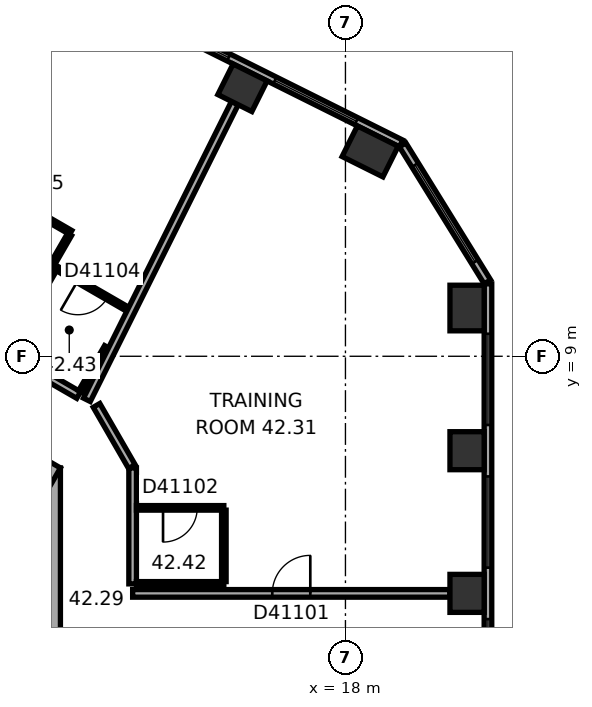
"""IFC4 building model, lengths in metres.
Left out: names, types, materials, properties, quantities, classifications, styles, units other than length and angle.
Written with IfcOpenShell. Run it as: python <this file> out.ifc"""

import sys

from ifc_helpers import new_model, si_unit, direction, frame, frame_2d, origin, origin_2d, place, context, subcontext, project, spatial, rectangle, extrude, element, fill, save


model = new_model("IFC4")
c1 = context("Model", 3, precision=1e-05, world=origin(), true_north=direction((0.0, 1.0)))
c2 = subcontext(c1, "Body", "Model", "MODEL_VIEW")
j1 = project(units=[si_unit("LENGTHUNIT", "METRE"), si_unit("PLANEANGLEUNIT", "RADIAN")], contexts=[c1])
p1 = place(None, origin())
s1 = spatial("IfcSite", under=j1, at=p1, CompositionType="ELEMENT")
p2 = place(p1, origin())
s2 = spatial("IfcBuilding", under=s1, at=p2, CompositionType="ELEMENT")
p3 = place(p2, frame((0.0, 0.0, 172.5)))
s3 = spatial("IfcBuildingStorey", under=s2, at=p3, CompositionType="ELEMENT", Elevation=172.5)
for number, where, z_axis, x_axis in (
    (1, (21.2, 2.761, 0.0), (0.0, 0.0, 1.0), (0.0, 1.0, 0.0)),
    (2, (21.2, 6.515, 0.0), (0.0, 0.0, 1.0), (0.0, 1.0, 0.0)),
):
    element("IfcColumn", number, at=place(p3, frame(where, z_axis=z_axis, x_axis=x_axis)), inside=s3, PredefinedType="COLUMN", context=c2, shape_type="SweptSolid", body=[
        extrude(rectangle(XDim=1.0, YDim=0.9, at=origin_2d()), origin(), (0.0, 0.0, 1.0), 3.7),
    ])
for number, where, z_axis, x_axis in (
    (3, (21.2, 10.27, 0.0), (0.0, 0.0, 1.0), (0.0, 1.0, 0.0)),
    (4, (18.65, 14.39, 0.0), (0.0, 0.0, 1.0), (-0.895, 0.446, 0.0)),
):
    element("IfcColumn", number, at=place(p3, frame(where, z_axis=z_axis, x_axis=x_axis)), inside=s3, PredefinedType="COLUMN", context=c2, shape_type="SweptSolid", body=[
        extrude(rectangle(XDim=1.2, YDim=0.9, at=origin_2d()), origin(), (0.0, 0.0, 1.0), 3.7),
    ])
p4 = place(p3, frame((15.29, 16.065, 0.0), z_axis=(0.0, 0.0, 1.0), x_axis=(-0.894934361602, 0.44619781311, 0.0)))
e5 = element("IfcColumn", 5, at=p4, inside=s3, PredefinedType="COLUMN", context=c2, shape_type="SweptSolid", body=[
    extrude(rectangle(XDim=1.0, YDim=0.9, at=origin_2d()), origin(), (0.0, 0.0, 1.0), 3.7),
])
p5 = place(p3, frame((10.0, -6.062, 0.0), z_axis=(0.0, 0.0, 1.0), x_axis=(0.0, 1.0, 0.0)))
e6 = element("IfcWall", 6, at=p5, inside=s3, PredefinedType="SHEAR", context=c2, shape_type="SweptSolid", body=[
    extrude(rectangle(XDim=12.125, YDim=1.0, at=frame_2d((6.062, 0.0))), origin(), (0.0, 0.0, 1.0), 3.7),
])
p6 = place(p5, frame((6.262, 0.0, 0.0)))
e7 = element("IfcOpeningElement", 7, at=p6, cuts=e6, PredefinedType="OPENING", context=c2, shape_type="SweptSolid", body=[
    extrude(rectangle(XDim=1.5, YDim=2.1, at=frame_2d((0.75, 1.05))), frame((0.0, 0.51, 0.0), z_axis=(0.0, -1.0, 0.0), x_axis=(1.0, 0.0, 0.0)), (0.0, 0.0, 1.0), 1.02),
])
p7 = place(p5, frame((1.812, 0.0, 0.0)))
e8 = element("IfcOpeningElement", 8, at=p7, cuts=e6, PredefinedType="OPENING", context=c2, shape_type="SweptSolid", body=[
    extrude(rectangle(XDim=0.9, YDim=2.1, at=frame_2d((0.45, 1.05))), frame((0.0, 0.51, 0.0), z_axis=(0.0, -1.0, 0.0), x_axis=(1.0, 0.0, 0.0)), (0.0, 0.0, 1.0), 1.02),
])
p8 = place(p5, frame((4.412, 0.0, 0.0)))
e9 = element("IfcOpeningElement", 9, at=p8, cuts=e6, PredefinedType="OPENING", context=c2, shape_type="SweptSolid", body=[
    extrude(rectangle(XDim=0.9, YDim=2.1, at=frame_2d((0.45, 1.05))), frame((0.0, 0.51, 0.0), z_axis=(0.0, -1.0, 0.0), x_axis=(1.0, 0.0, 0.0)), (0.0, 0.0, 1.0), 1.02),
])
p9 = place(p3, frame((10.25, 5.629, 0.0), z_axis=(0.0, 0.0, 1.0), x_axis=(-0.866022616891, 0.50000482701, 0.0)))
e10 = element("IfcWall", 10, at=p9, inside=s3, PredefinedType="SHEAR", context=c2, shape_type="SweptSolid", body=[
    extrude(rectangle(XDim=12.125, YDim=1.0, at=frame_2d((6.062, 0.0))), origin(), (0.0, 0.0, 1.0), 3.7),
])
p10 = place(p9, frame((4.012, 0.0, 0.0)))
e11 = element("IfcOpeningElement", 11, at=p10, cuts=e10, PredefinedType="OPENING", context=c2, shape_type="SweptSolid", body=[
    extrude(rectangle(XDim=0.9, YDim=2.1, at=frame_2d((0.45, 1.05))), frame((0.0, 0.51, 0.0), z_axis=(0.0, -1.0, 0.0), x_axis=(1.0, 0.0, 0.0)), (0.0, 0.0, 1.0), 1.02),
])
p11 = place(p9, frame((7.912, 0.0, 0.0)))
e12 = element("IfcOpeningElement", 12, at=p11, cuts=e10, PredefinedType="OPENING", context=c2, shape_type="SweptSolid", body=[
    extrude(rectangle(XDim=0.9, YDim=2.1, at=frame_2d((0.45, 1.05))), frame((0.0, 0.51, 0.0), z_axis=(0.0, -1.0, 0.0), x_axis=(1.0, 0.0, 0.0)), (0.0, 0.0, 1.0), 1.02),
])
p12 = place(p3, frame((21.75, -9.138, 0.0), z_axis=(0.0, 0.0, 1.0), x_axis=(0.0, 1.0, 0.0)))
e13 = element("IfcWall", 13, at=p12, inside=s3, PredefinedType="STANDARD", context=c2, shape_type="SweptSolid", body=[
    extrude(rectangle(XDim=20.044, YDim=0.2, at=frame_2d((10.022, 0.0))), origin(), (0.0, 0.0, 1.0), 3.7),
])
p13 = place(p12, frame((1.314, 0.0, 0.9)))
e14 = element("IfcOpeningElement", 14, at=p13, cuts=e13, PredefinedType="OPENING", context=c2, shape_type="SweptSolid", body=[
    extrude(rectangle(XDim=2.4, YDim=2.0, at=frame_2d((1.2, 1.0))), frame((0.0, 0.11, 0.0), z_axis=(0.0, -1.0, 0.0), x_axis=(1.0, 0.0, 0.0)), (0.0, 0.0, 1.0), 0.22),
])
p14 = place(p12, frame((5.069, 0.0, 0.9)))
e15 = element("IfcOpeningElement", 15, at=p14, cuts=e13, PredefinedType="OPENING", context=c2, shape_type="SweptSolid", body=[
    extrude(rectangle(XDim=2.4, YDim=2.0, at=frame_2d((1.2, 1.0))), frame((0.0, 0.11, 0.0), z_axis=(0.0, -1.0, 0.0), x_axis=(1.0, 0.0, 0.0)), (0.0, 0.0, 1.0), 0.22),
])
p15 = place(p12, frame((8.823, 0.0, 0.9)))
e16 = element("IfcOpeningElement", 16, at=p15, cuts=e13, PredefinedType="OPENING", context=c2, shape_type="SweptSolid", body=[
    extrude(rectangle(XDim=2.4, YDim=2.0, at=frame_2d((1.2, 1.0))), frame((0.0, 0.11, 0.0), z_axis=(0.0, -1.0, 0.0), x_axis=(1.0, 0.0, 0.0)), (0.0, 0.0, 1.0), 0.22),
])
p16 = place(p12, frame((12.577, 0.0, 0.9)))
e17 = element("IfcOpeningElement", 17, at=p16, cuts=e13, PredefinedType="OPENING", context=c2, shape_type="SweptSolid", body=[
    extrude(rectangle(XDim=2.4, YDim=2.0, at=frame_2d((1.2, 1.0))), frame((0.0, 0.11, 0.0), z_axis=(0.0, -1.0, 0.0), x_axis=(1.0, 0.0, 0.0)), (0.0, 0.0, 1.0), 0.22),
])
p17 = place(p12, frame((16.331, 0.0, 0.9)))
e18 = element("IfcOpeningElement", 18, at=p17, cuts=e13, PredefinedType="OPENING", context=c2, shape_type="SweptSolid", body=[
    extrude(rectangle(XDim=2.4, YDim=2.0, at=frame_2d((1.2, 1.0))), frame((0.0, 0.11, 0.0), z_axis=(0.0, -1.0, 0.0), x_axis=(1.0, 0.0, 0.0)), (0.0, 0.0, 1.0), 0.22),
])
p18 = place(p3, frame((21.735, 10.958, 0.0), z_axis=(0.0, 0.0, 1.0), x_axis=(-0.526213807775, 0.850352296702, 0.0)))
e19 = element("IfcWall", 19, at=p18, inside=s3, PredefinedType="STANDARD", context=c2, shape_type="SweptSolid", body=[
    extrude(rectangle(XDim=4.238, YDim=0.2, at=frame_2d((2.119, 0.0))), origin(), (0.0, 0.0, 1.0), 3.7),
])
p19 = place(p18, frame((0.619, 0.0, 0.9)))
e20 = element("IfcOpeningElement", 20, at=p19, cuts=e19, PredefinedType="OPENING", context=c2, shape_type="SweptSolid", body=[
    extrude(rectangle(XDim=3.0, YDim=2.0, at=frame_2d((1.5, 1.0))), frame((0.0, 0.11, 0.0), z_axis=(0.0, -1.0, 0.0), x_axis=(1.0, 0.0, 0.0)), (0.0, 0.0, 1.0), 0.22),
])
p20 = place(p3, frame((19.464, 14.599, 0.0), z_axis=(0.0, 0.0, 1.0), x_axis=(-0.894935755043, 0.446195018289, 0.0)))
e21 = element("IfcWall", 21, at=p20, inside=s3, PredefinedType="STANDARD", context=c2, shape_type="SweptSolid", body=[
    extrude(rectangle(XDim=20.044, YDim=0.2, at=frame_2d((10.022, 0.0))), origin(), (0.0, 0.0, 1.0), 3.7),
])
p21 = place(p20, frame((1.313, 0.0, 0.9)))
e22 = element("IfcOpeningElement", 22, at=p21, cuts=e21, PredefinedType="OPENING", context=c2, shape_type="SweptSolid", body=[
    extrude(rectangle(XDim=2.4, YDim=2.0, at=frame_2d((1.2, 1.0))), frame((0.0, 0.11, 0.0), z_axis=(0.0, -1.0, 0.0), x_axis=(1.0, 0.0, 0.0)), (0.0, 0.0, 1.0), 0.22),
])
p22 = place(p20, frame((5.067, 0.0, 0.9)))
e23 = element("IfcOpeningElement", 23, at=p22, cuts=e21, PredefinedType="OPENING", context=c2, shape_type="SweptSolid", body=[
    extrude(rectangle(XDim=2.4, YDim=2.0, at=frame_2d((1.2, 1.0))), frame((0.0, 0.11, 0.0), z_axis=(0.0, -1.0, 0.0), x_axis=(1.0, 0.0, 0.0)), (0.0, 0.0, 1.0), 0.22),
])
p23 = place(p20, frame((8.821, 0.0, 0.9)))
e24 = element("IfcOpeningElement", 24, at=p23, cuts=e21, PredefinedType="OPENING", context=c2, shape_type="SweptSolid", body=[
    extrude(rectangle(XDim=2.4, YDim=2.0, at=frame_2d((1.2, 1.0))), frame((0.0, 0.11, 0.0), z_axis=(0.0, -1.0, 0.0), x_axis=(1.0, 0.0, 0.0)), (0.0, 0.0, 1.0), 0.22),
])
p24 = place(p20, frame((12.575, 0.0, 0.9)))
e25 = element("IfcOpeningElement", 25, at=p24, cuts=e21, PredefinedType="OPENING", context=c2, shape_type="SweptSolid", body=[
    extrude(rectangle(XDim=2.4, YDim=2.0, at=frame_2d((1.2, 1.0))), frame((0.0, 0.11, 0.0), z_axis=(0.0, -1.0, 0.0), x_axis=(1.0, 0.0, 0.0)), (0.0, 0.0, 1.0), 0.22),
])
p25 = place(p20, frame((16.329, 0.0, 0.9)))
e26 = element("IfcOpeningElement", 26, at=p25, cuts=e21, PredefinedType="OPENING", context=c2, shape_type="SweptSolid", body=[
    extrude(rectangle(XDim=2.4, YDim=2.0, at=frame_2d((1.2, 1.0))), frame((0.0, 0.11, 0.0), z_axis=(0.0, -1.0, 0.0), x_axis=(1.0, 0.0, 0.0)), (0.0, 0.0, 1.0), 0.22),
])
p26 = place(p3, frame((7.878, 13.927, 0.0), z_axis=(0.0, 0.0, 1.0), x_axis=(0.866021245731, -0.500007201891, 0.0)))
e27 = element("IfcWall", 27, at=p26, inside=s3, PredefinedType="PARTITIONING", context=c2, shape_type="SweptSolid", body=[
    extrude(rectangle(XDim=3.34, YDim=0.12, at=frame_2d((1.67, 0.0))), origin(), (0.0, 0.0, 1.0), 3.42),
])
p27 = place(p26, frame((1.22, 0.0, 0.0)))
e28 = element("IfcOpeningElement", 28, at=p27, cuts=e27, PredefinedType="OPENING", context=c2, shape_type="SweptSolid", body=[
    extrude(rectangle(XDim=0.9, YDim=2.1, at=frame_2d((0.45, 1.05))), frame((0.0, 0.07, 0.0), z_axis=(0.0, -1.0, 0.0), x_axis=(1.0, 0.0, 0.0)), (0.0, 0.0, 1.0), 0.14),
])
p28 = place(p3, frame((9.125, 9.166, 0.0), z_axis=(0.0, 0.0, 1.0), x_axis=(0.500004234368, 0.866022959057, 0.0)))
e29 = element("IfcWall", 29, at=p28, inside=s3, PredefinedType="PARTITIONING", context=c2, shape_type="SweptSolid", body=[
    extrude(rectangle(XDim=2.5, YDim=0.12, at=frame_2d((1.25, 0.0))), origin(), (0.0, 0.0, 1.0), 3.42),
])
p29 = place(p3, frame((10.427, 11.301, 0.0), z_axis=(0.0, 0.0, 1.0), x_axis=(0.866019511163, -0.500010206181, 0.0)))
e30 = element("IfcWall", 30, at=p29, inside=s3, PredefinedType="PARTITIONING", context=c2, shape_type="SweptSolid", body=[
    extrude(rectangle(XDim=2.13, YDim=0.12, at=frame_2d((1.065, 0.0))), origin(), (0.0, 0.0, 1.0), 3.42),
])
p30 = place(p29, frame((0.615, 0.0, 0.0)))
e31 = element("IfcOpeningElement", 31, at=p30, cuts=e30, PredefinedType="OPENING", context=c2, shape_type="SweptSolid", body=[
    extrude(rectangle(XDim=0.9, YDim=2.1, at=frame_2d((0.45, 1.05))), frame((0.0, 0.07, 0.0), z_axis=(0.0, -1.0, 0.0), x_axis=(1.0, 0.0, 0.0)), (0.0, 0.0, 1.0), 0.14),
])
p31 = place(p3, frame((10.74, 12.205, 0.0), z_axis=(0.0, 0.0, 1.0), x_axis=(-0.499978425106, -0.866037859697, 0.0)))
e32 = element("IfcWall", 32, at=p31, inside=s3, PredefinedType="PARTITIONING", context=c2, shape_type="SweptSolid", body=[
    extrude(rectangle(XDim=3.44, YDim=0.12, at=frame_2d((1.72, 0.0))), origin(), (0.0, 0.0, 1.0), 3.42),
])
p32 = place(p3, frame((10.98, 7.979, 0.0), z_axis=(0.0, 0.0, 1.0), x_axis=(-0.866008176907, 0.50002983664, 0.0)))
e33 = element("IfcWall", 33, at=p32, inside=s3, PredefinedType="PARTITIONING", context=c2, shape_type="SweptSolid", body=[
    extrude(rectangle(XDim=2.2, YDim=0.2, at=frame_2d((1.1, 0.0))), origin(), (0.0, 0.0, 1.0), 3.42),
])
p33 = place(p3, frame((11.714, 9.25, 0.0), z_axis=(0.0, 0.0, 1.0), x_axis=(-0.500015945769, -0.866016197294, 0.0)))
e34 = element("IfcWall", 34, at=p33, inside=s3, PredefinedType="PARTITIONING", context=c2, shape_type="SweptSolid", body=[
    extrude(rectangle(XDim=1.368, YDim=0.12, at=frame_2d((0.684, 0.0))), origin(), (0.0, 0.0, 1.0), 3.42),
])
p34 = place(p3, frame((12.38, 6.097, 0.0), z_axis=(0.0, 0.0, 1.0), x_axis=(-0.499964847546, 0.866045698112, 0.0)))
e35 = element("IfcWall", 35, at=p34, inside=s3, PredefinedType="PARTITIONING", context=c2, shape_type="SweptSolid", body=[
    extrude(rectangle(XDim=1.86, YDim=0.2, at=frame_2d((0.93, 0.0))), origin(), (0.0, 0.0, 1.0), 3.42),
])
p35 = place(p3, frame((12.4, 3.011, 0.0), z_axis=(0.0, 0.0, 1.0), x_axis=(0.0, 1.0, 0.0)))
e36 = element("IfcWall", 36, at=p35, inside=s3, PredefinedType="PARTITIONING", context=c2, shape_type="SweptSolid", body=[
    extrude(rectangle(XDim=3.051, YDim=0.2, at=frame_2d((1.525, 0.0))), origin(), (0.0, 0.0, 1.0), 3.42),
])
p36 = place(p3, frame((12.5, 5.011, 0.0), z_axis=(0.0, 0.0, 1.0), x_axis=(1.0, 0.0, 0.0)))
e37 = element("IfcWall", 37, at=p36, inside=s3, PredefinedType="PARTITIONING", context=c2, shape_type="SweptSolid", body=[
    extrude(rectangle(XDim=2.3, YDim=0.12, at=frame_2d((1.15, 0.0))), origin(), (0.0, 0.0, 1.0), 3.42),
])
p37 = place(p36, frame((0.7, 0.0, 0.0)))
e38 = element("IfcOpeningElement", 38, at=p37, cuts=e37, PredefinedType="OPENING", context=c2, shape_type="SweptSolid", body=[
    extrude(rectangle(XDim=0.9, YDim=2.1, at=frame_2d((0.45, 1.05))), frame((0.0, 0.07, 0.0), z_axis=(0.0, -1.0, 0.0), x_axis=(1.0, 0.0, 0.0)), (0.0, 0.0, 1.0), 0.14),
])
p38 = place(p3, frame((14.8, 3.011, 0.0), z_axis=(0.0, 0.0, 1.0), x_axis=(-1.0, 0.0, 0.0)))
e39 = element("IfcWall", 39, at=p38, inside=s3, PredefinedType="PARTITIONING", context=c2, shape_type="SweptSolid", body=[
    extrude(rectangle(XDim=2.3, YDim=0.12, at=frame_2d((1.15, 0.0))), origin(), (0.0, 0.0, 1.0), 3.42),
])
p39 = place(p3, frame((14.8, 4.951, 0.0), z_axis=(0.0, 0.0, 1.0), x_axis=(0.0, -1.0, 0.0)))
e40 = element("IfcWall", 40, at=p39, inside=s3, PredefinedType="PARTITIONING", context=c2, shape_type="SweptSolid", body=[
    extrude(rectangle(XDim=1.88, YDim=0.12, at=frame_2d((0.94, 0.0))), origin(), (0.0, 0.0, 1.0), 3.42),
])
p40 = place(p3, frame((15.09, 15.663, 0.0), z_axis=(0.0, 0.0, 1.0), x_axis=(-0.446206011687, -0.894930273895, 0.0)))
e41 = element("IfcWall", 41, at=p40, inside=s3, PredefinedType="PARTITIONING", context=c2, shape_type="SweptSolid", body=[
    extrude(rectangle(XDim=8.725, YDim=0.2, at=frame_2d((4.363, 0.0))), origin(), (0.0, 0.0, 1.0), 3.42),
])
p41 = place(p3, frame((20.75, 2.761, 0.0), z_axis=(0.0, 0.0, 1.0), x_axis=(-1.0, 0.0, 0.0)))
e42 = element("IfcWall", 42, at=p41, inside=s3, PredefinedType="PARTITIONING", context=c2, shape_type="SweptSolid", body=[
    extrude(rectangle(XDim=8.35, YDim=0.2, at=frame_2d((4.175, 0.0))), origin(), (0.0, 0.0, 1.0), 3.42),
])
p42 = place(p41, frame((3.675, 0.0, 0.0)))
e43 = element("IfcOpeningElement", 43, at=p42, cuts=e42, PredefinedType="OPENING", context=c2, shape_type="SweptSolid", body=[
    extrude(rectangle(XDim=1.0, YDim=2.1, at=frame_2d((0.5, 1.05))), frame((0.0, 0.11, 0.0), z_axis=(0.0, -1.0, 0.0), x_axis=(1.0, 0.0, 0.0)), (0.0, 0.0, 1.0), 0.22),
])
p43 = place(p15, origin())
e44 = element("IfcWindow", 44, at=p43, inside=s3, PartitioningType="SINGLE_PANEL", PredefinedType="WINDOW", context=c2, shape_type="SweptSolid", body=[
    extrude(rectangle(XDim=2.4, YDim=2.0, at=frame_2d((1.2, 1.0))), frame((0.0, 0.03, 0.0), z_axis=(0.0, -1.0, 0.0), x_axis=(1.0, 0.0, 0.0)), (0.0, 0.0, 1.0), 0.06),
])
fill(e16, e44)
p44 = place(p16, origin())
e45 = element("IfcWindow", 45, at=p44, inside=s3, PartitioningType="SINGLE_PANEL", PredefinedType="WINDOW", context=c2, shape_type="SweptSolid", body=[
    extrude(rectangle(XDim=2.4, YDim=2.0, at=frame_2d((1.2, 1.0))), frame((0.0, 0.03, 0.0), z_axis=(0.0, -1.0, 0.0), x_axis=(1.0, 0.0, 0.0)), (0.0, 0.0, 1.0), 0.06),
])
fill(e17, e45)
p45 = place(p17, origin())
e46 = element("IfcWindow", 46, at=p45, inside=s3, PartitioningType="SINGLE_PANEL", PredefinedType="WINDOW", context=c2, shape_type="SweptSolid", body=[
    extrude(rectangle(XDim=2.4, YDim=2.0, at=frame_2d((1.2, 1.0))), frame((0.0, 0.03, 0.0), z_axis=(0.0, -1.0, 0.0), x_axis=(1.0, 0.0, 0.0)), (0.0, 0.0, 1.0), 0.06),
])
fill(e18, e46)
p46 = place(p19, origin())
e47 = element("IfcWindow", 47, at=p46, inside=s3, PartitioningType="SINGLE_PANEL", PredefinedType="WINDOW", context=c2, shape_type="SweptSolid", body=[
    extrude(rectangle(XDim=3.0, YDim=2.0, at=frame_2d((1.5, 1.0))), frame((0.0, 0.03, 0.0), z_axis=(0.0, -1.0, 0.0), x_axis=(1.0, 0.0, 0.0)), (0.0, 0.0, 1.0), 0.06),
])
fill(e20, e47)
p47 = place(p21, origin())
e48 = element("IfcWindow", 48, at=p47, inside=s3, PartitioningType="SINGLE_PANEL", PredefinedType="WINDOW", context=c2, shape_type="SweptSolid", body=[
    extrude(rectangle(XDim=2.4, YDim=2.0, at=frame_2d((1.2, 1.0))), frame((0.0, 0.03, 0.0), z_axis=(0.0, -1.0, 0.0), x_axis=(1.0, 0.0, 0.0)), (0.0, 0.0, 1.0), 0.06),
])
fill(e22, e48)
p48 = place(p22, origin())
e49 = element("IfcWindow", 49, at=p48, inside=s3, PartitioningType="SINGLE_PANEL", PredefinedType="WINDOW", context=c2, shape_type="SweptSolid", body=[
    extrude(rectangle(XDim=2.4, YDim=2.0, at=frame_2d((1.2, 1.0))), frame((0.0, 0.03, 0.0), z_axis=(0.0, -1.0, 0.0), x_axis=(1.0, 0.0, 0.0)), (0.0, 0.0, 1.0), 0.06),
])
fill(e23, e49)
p49 = place(p42, origin())
e50 = element("IfcDoor", 50, at=p49, inside=s3, OperationType="SINGLE_SWING_LEFT", PredefinedType="DOOR", context=c2, shape_type="SweptSolid", body=[
    extrude(rectangle(XDim=1.0, YDim=2.1, at=frame_2d((0.5, 1.05))), frame((0.0, 0.025, 0.0), z_axis=(0.0, -1.0, 0.0), x_axis=(1.0, 0.0, 0.0)), (0.0, 0.0, 1.0), 0.05),
])
fill(e43, e50)
p50 = place(p37, origin())
e51 = element("IfcDoor", 51, at=p50, inside=s3, OperationType="SINGLE_SWING_LEFT", PredefinedType="DOOR", context=c2, shape_type="SweptSolid", body=[
    extrude(rectangle(XDim=0.9, YDim=2.1, at=frame_2d((0.45, 1.05))), frame((0.0, 0.025, 0.0), z_axis=(0.0, -1.0, 0.0), x_axis=(1.0, 0.0, 0.0)), (0.0, 0.0, 1.0), 0.05),
])
fill(e38, e51)
p51 = place(p30, origin())
e52 = element("IfcDoor", 52, at=p51, inside=s3, OperationType="SINGLE_SWING_LEFT", PredefinedType="DOOR", context=c2, shape_type="SweptSolid", body=[
    extrude(rectangle(XDim=0.9, YDim=2.1, at=frame_2d((0.45, 1.05))), frame((0.0, 0.025, 0.0), z_axis=(0.0, -1.0, 0.0), x_axis=(1.0, 0.0, 0.0)), (0.0, 0.0, 1.0), 0.05),
])
fill(e31, e52)
save(model, sys.argv[1])
